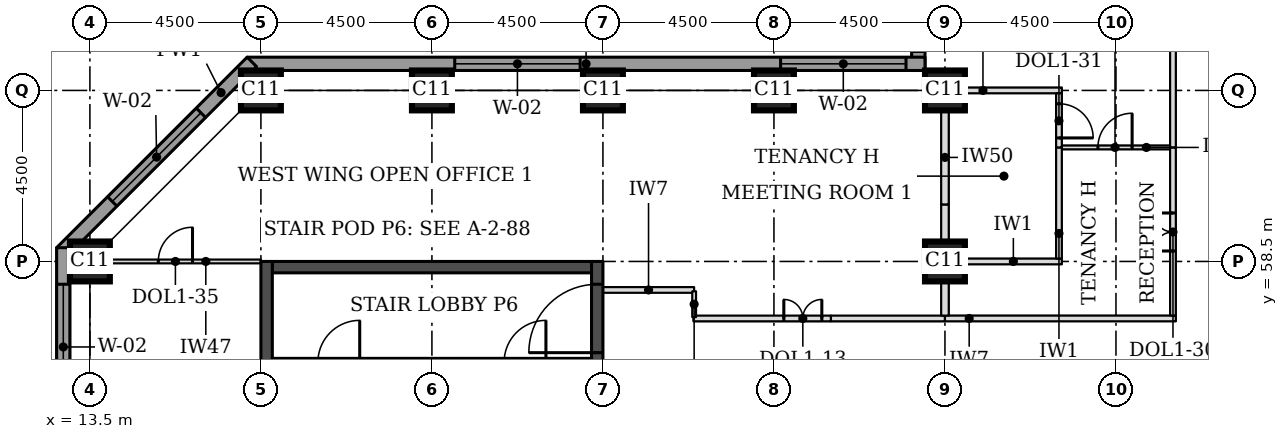
"""IFC4 building model, lengths in metres.
Left out: names, types, materials, properties, quantities, classifications, styles, units other than length and angle.
Written with IfcOpenShell. Run it as: python <this file> out.ifc"""

import sys

from ifc_helpers import new_model, si_unit, direction, frame, frame_2d, origin, origin_2d, place, context, subcontext, project, spatial, rectangle, extrude, element, fill, save


model = new_model("IFC4")
c1 = context("Model", 3, precision=1e-05, world=origin(), true_north=direction((0.0, 1.0)))
c2 = subcontext(c1, "Body", "Model", "MODEL_VIEW")
j1 = project(units=[si_unit("LENGTHUNIT", "METRE"), si_unit("PLANEANGLEUNIT", "RADIAN")], contexts=[c1])
p1 = place(None, origin())
s1 = spatial("IfcSite", under=j1, at=p1, CompositionType="ELEMENT")
p2 = place(p1, origin())
s2 = spatial("IfcBuilding", under=s1, at=p2, CompositionType="ELEMENT")
p3 = place(p2, frame((0.0, 0.0, 78.9)))
s3 = spatial("IfcBuildingStorey", under=s2, at=p3, CompositionType="ELEMENT", Elevation=78.9)
for number, where, z_axis, x_axis in (
    (1, (13.5, 58.5, 0.0), (0.0, 0.0, 1.0), (1.0, 0.0, 0.0)),
    (2, (36.0, 58.5, 0.0), (0.0, 0.0, 1.0), (1.0, 0.0, 0.0)),
    (3, (18.0, 63.0, 0.0), (0.0, 0.0, 1.0), (1.0, 0.0, 0.0)),
    (4, (22.5, 63.0, 0.0), (0.0, 0.0, 1.0), (1.0, 0.0, 0.0)),
    (5, (27.0, 63.0, 0.0), (0.0, 0.0, 1.0), (1.0, 0.0, 0.0)),
    (6, (31.5, 63.0, 0.0), (0.0, 0.0, 1.0), (1.0, 0.0, 0.0)),
    (7, (36.0, 63.0, 0.0), (0.0, 0.0, 1.0), (1.0, 0.0, 0.0)),
):
    element("IfcColumn", number, at=place(p3, frame(where, z_axis=z_axis, x_axis=x_axis)), inside=s3, PredefinedType="COLUMN", context=c2, shape_type="SweptSolid", body=[
        extrude(rectangle(XDim=1.05, YDim=1.05, at=origin_2d()), origin(), (0.0, 0.0, 1.0), 3.7),
    ])
p4 = place(p3, frame((18.3, 58.35, 0.0), z_axis=(0.0, 0.0, 1.0), x_axis=(1.0, 0.0, 0.0)))
e8 = element("IfcWall", 8, at=p4, inside=s3, PredefinedType="SHEAR", context=c2, shape_type="SweptSolid", body=[
    extrude(rectangle(XDim=8.4, YDim=0.3, at=frame_2d((4.2, 0.0))), origin(), (0.0, 0.0, 1.0), 3.7),
])
p5 = place(p3, frame((18.15, 49.5, 0.0), z_axis=(0.0, 0.0, 1.0), x_axis=(0.0, 1.0, 0.0)))
e9 = element("IfcWall", 9, at=p5, inside=s3, PredefinedType="SHEAR", context=c2, shape_type="SweptSolid", body=[
    extrude(rectangle(XDim=9.0, YDim=0.3, at=frame_2d((4.5, 0.0))), origin(), (0.0, 0.0, 1.0), 3.7),
])
p6 = place(p3, frame((26.85, 49.5, 0.0), z_axis=(0.0, 0.0, 1.0), x_axis=(0.0, 1.0, 0.0)))
e10 = element("IfcWall", 10, at=p6, inside=s3, PredefinedType="SHEAR", context=c2, shape_type="SweptSolid", body=[
    extrude(rectangle(XDim=9.0, YDim=0.3, at=frame_2d((4.5, 0.0))), origin(), (0.0, 0.0, 1.0), 3.7),
])
p7 = place(p6, frame((6.6, 0.0, 0.0)))
e11 = element("IfcOpeningElement", 11, at=p7, cuts=e10, PredefinedType="OPENING", context=c2, shape_type="SweptSolid", body=[
    extrude(rectangle(XDim=1.8, YDim=2.1, at=frame_2d((0.9, 1.05))), frame((0.0, 0.16, 0.0), z_axis=(0.0, -1.0, 0.0), x_axis=(1.0, 0.0, 0.0)), (0.0, 0.0, 1.0), 0.32),
])
p8 = place(p3, frame((35.3, 76.862, 0.0), z_axis=(0.0, 0.0, 1.0), x_axis=(0.0, -1.0, 0.0)))
e12 = element("IfcWall", 12, at=p8, inside=s3, PredefinedType="STANDARD", context=c2, shape_type="SweptSolid", body=[
    extrude(rectangle(XDim=13.337, YDim=0.35, at=frame_2d((6.669, 0.0))), origin(), (0.0, 0.0, 1.0), 3.525),
])
p9 = place(p8, frame((9.537, 0.0, 0.9)))
e13 = element("IfcOpeningElement", 13, at=p9, cuts=e12, PredefinedType="OPENING", context=c2, shape_type="SweptSolid", body=[
    extrude(rectangle(XDim=3.3, YDim=1.9, at=frame_2d((1.65, 0.95))), frame((0.0, 0.185, 0.0), z_axis=(0.0, -1.0, 0.0), x_axis=(1.0, 0.0, 0.0)), (0.0, 0.0, 1.0), 0.37),
])
p10 = place(p3, frame((35.475, 63.7, 0.0), z_axis=(0.0, 0.0, 1.0), x_axis=(-1.0, 0.0, 0.0)))
e14 = element("IfcWall", 14, at=p10, inside=s3, PredefinedType="STANDARD", context=c2, shape_type="SweptSolid", body=[
    extrude(rectangle(XDim=17.837, YDim=0.35, at=frame_2d((8.919, 0.0))), origin(), (0.0, 0.0, 1.0), 3.525),
])
p11 = place(p10, frame((0.5, 0.0, 0.9)))
e15 = element("IfcOpeningElement", 15, at=p11, cuts=e14, PredefinedType="OPENING", context=c2, shape_type="SweptSolid", body=[
    extrude(rectangle(XDim=3.3, YDim=1.9, at=frame_2d((1.65, 0.95))), frame((0.0, 0.185, 0.0), z_axis=(0.0, -1.0, 0.0), x_axis=(1.0, 0.0, 0.0)), (0.0, 0.0, 1.0), 0.37),
])
p12 = place(p10, frame((9.075, 0.0, 0.9)))
e16 = element("IfcOpeningElement", 16, at=p12, cuts=e14, PredefinedType="OPENING", context=c2, shape_type="SweptSolid", body=[
    extrude(rectangle(XDim=3.3, YDim=1.9, at=frame_2d((1.65, 0.95))), frame((0.0, 0.185, 0.0), z_axis=(0.0, -1.0, 0.0), x_axis=(1.0, 0.0, 0.0)), (0.0, 0.0, 1.0), 0.37),
])
p13 = place(p3, frame((17.761, 63.751, 0.0), z_axis=(0.0, 0.0, 1.0), x_axis=(-0.707106781187, -0.707106781187, 0.0)))
e17 = element("IfcWall", 17, at=p13, inside=s3, PredefinedType="STANDARD", context=c2, shape_type="SweptSolid", body=[
    extrude(rectangle(XDim=7.089, YDim=0.35, at=frame_2d((3.544, 0.0))), origin(), (0.0, 0.0, 1.0), 3.525),
])
p14 = place(p13, frame((1.894, 0.0, 0.9)))
e18 = element("IfcOpeningElement", 18, at=p14, cuts=e17, PredefinedType="OPENING", context=c2, shape_type="SweptSolid", body=[
    extrude(rectangle(XDim=3.3, YDim=1.9, at=frame_2d((1.65, 0.95))), frame((0.0, 0.185, 0.0), z_axis=(0.0, -1.0, 0.0), x_axis=(1.0, 0.0, 0.0)), (0.0, 0.0, 1.0), 0.37),
])
p15 = place(p3, frame((12.8, 58.862, 0.0), z_axis=(0.0, 0.0, 1.0), x_axis=(0.0, -1.0, 0.0)))
e19 = element("IfcWall", 19, at=p15, inside=s3, PredefinedType="STANDARD", context=c2, shape_type="SweptSolid", body=[
    extrude(rectangle(XDim=14.225, YDim=0.35, at=frame_2d((7.112, 0.0))), origin(), (0.0, 0.0, 1.0), 3.525),
])
p16 = place(p15, frame((0.962, 0.0, 0.9)))
e20 = element("IfcOpeningElement", 20, at=p16, cuts=e19, PredefinedType="OPENING", context=c2, shape_type="SweptSolid", body=[
    extrude(rectangle(XDim=3.3, YDim=1.9, at=frame_2d((1.65, 0.95))), frame((0.0, 0.185, 0.0), z_axis=(0.0, -1.0, 0.0), x_axis=(1.0, 0.0, 0.0)), (0.0, 0.0, 1.0), 0.37),
])
p17 = place(p15, frame((5.462, 0.0, 0.9)))
e21 = element("IfcOpeningElement", 21, at=p17, cuts=e19, PredefinedType="OPENING", context=c2, shape_type="SweptSolid", body=[
    extrude(rectangle(XDim=3.3, YDim=1.9, at=frame_2d((1.65, 0.95))), frame((0.0, 0.185, 0.0), z_axis=(0.0, -1.0, 0.0), x_axis=(1.0, 0.0, 0.0)), (0.0, 0.0, 1.0), 0.37),
])
p18 = place(p15, frame((9.962, 0.0, 0.9)))
e22 = element("IfcOpeningElement", 22, at=p18, cuts=e19, PredefinedType="OPENING", context=c2, shape_type="SweptSolid", body=[
    extrude(rectangle(XDim=3.3, YDim=1.9, at=frame_2d((1.65, 0.95))), frame((0.0, 0.185, 0.0), z_axis=(0.0, -1.0, 0.0), x_axis=(1.0, 0.0, 0.0)), (0.0, 0.0, 1.0), 0.37),
])
p19 = place(p3, frame((29.38, 57.0, 0.0), z_axis=(0.0, 0.0, 1.0), x_axis=(1.0, 0.0, 0.0)))
e23 = element("IfcWall", 23, at=p19, inside=s3, PredefinedType="PARTITIONING", context=c2, shape_type="SweptSolid", body=[
    extrude(rectangle(XDim=3.62, YDim=0.15, at=frame_2d((1.81, 0.0))), origin(), (0.0, 0.0, 1.0), 3.55),
])
p20 = place(p19, frame((2.38, 0.0, 0.0)))
e24 = element("IfcOpeningElement", 24, at=p20, cuts=e23, PredefinedType="OPENING", context=c2, shape_type="SweptSolid", body=[
    extrude(rectangle(XDim=1.0, YDim=2.1, at=frame_2d((0.5, 1.05))), frame((0.0, 0.085, 0.0), z_axis=(0.0, -1.0, 0.0), x_axis=(1.0, 0.0, 0.0)), (0.0, 0.0, 1.0), 0.17),
])
p21 = place(p3, frame((33.0, 57.0, 0.0), z_axis=(0.0, 0.0, 1.0), x_axis=(1.0, 0.0, 0.0)))
e25 = element("IfcWall", 25, at=p21, inside=s3, PredefinedType="PARTITIONING", context=c2, shape_type="SweptSolid", body=[
    extrude(rectangle(XDim=3.0, YDim=0.15, at=frame_2d((1.5, 0.0))), origin(), (0.0, 0.0, 1.0), 3.55),
])
p22 = place(p3, frame((36.0, 57.0, 0.0), z_axis=(0.0, 0.0, 1.0), x_axis=(1.0, 0.0, 0.0)))
e26 = element("IfcWall", 26, at=p22, inside=s3, PredefinedType="PARTITIONING", context=c2, shape_type="SweptSolid", body=[
    extrude(rectangle(XDim=6.075, YDim=0.15, at=frame_2d((3.038, 0.0))), origin(), (0.0, 0.0, 1.0), 3.55),
])
p23 = place(p3, frame((36.525, 58.5, 0.0), z_axis=(0.0, 0.0, 1.0), x_axis=(1.0, 0.0, 0.0)))
e27 = element("IfcWall", 27, at=p23, inside=s3, PredefinedType="PARTITIONING", context=c2, shape_type="SweptSolid", body=[
    extrude(rectangle(XDim=2.55, YDim=0.15, at=frame_2d((1.275, 0.0))), origin(), (0.0, 0.0, 1.0), 3.55),
])
p24 = place(p3, frame((39.075, 61.5, 0.0), z_axis=(0.0, 0.0, 1.0), x_axis=(1.0, 0.0, 0.0)))
e28 = element("IfcWall", 28, at=p24, inside=s3, PredefinedType="PARTITIONING", context=c2, shape_type="SweptSolid", body=[
    extrude(rectangle(XDim=2.85, YDim=0.1, at=frame_2d((1.425, 0.0))), origin(), (0.0, 0.0, 1.0), 3.55),
])
p25 = place(p24, frame((0.95, 0.0, 0.0)))
e29 = element("IfcOpeningElement", 29, at=p25, cuts=e28, PredefinedType="OPENING", context=c2, shape_type="SweptSolid", body=[
    extrude(rectangle(XDim=0.9, YDim=2.1, at=frame_2d((0.45, 1.05))), frame((0.0, 0.06, 0.0), z_axis=(0.0, -1.0, 0.0), x_axis=(1.0, 0.0, 0.0)), (0.0, 0.0, 1.0), 0.12),
])
p26 = place(p3, frame((36.525, 63.0, 0.0), z_axis=(0.0, 0.0, 1.0), x_axis=(1.0, 0.0, 0.0)))
e30 = element("IfcWall", 30, at=p26, inside=s3, PredefinedType="PARTITIONING", context=c2, shape_type="SweptSolid", body=[
    extrude(rectangle(XDim=2.55, YDim=0.15, at=frame_2d((1.275, 0.0))), origin(), (0.0, 0.0, 1.0), 3.55),
])
p27 = place(p3, frame((36.0, 57.075, 0.0), z_axis=(0.0, 0.0, 1.0), x_axis=(0.0, 1.0, 0.0)))
e31 = element("IfcWall", 31, at=p27, inside=s3, PredefinedType="PARTITIONING", context=c2, shape_type="SweptSolid", body=[
    extrude(rectangle(XDim=0.9, YDim=0.2, at=frame_2d((0.45, 0.0))), origin(), (0.0, 0.0, 1.0), 2.8),
])
p28 = place(p3, frame((42.0, 57.075, 0.0), z_axis=(0.0, 0.0, 1.0), x_axis=(0.0, 1.0, 0.0)))
e32 = element("IfcWall", 32, at=p28, inside=s3, PredefinedType="PARTITIONING", context=c2, shape_type="SweptSolid", body=[
    extrude(rectangle(XDim=4.425, YDim=0.15, at=frame_2d((2.212, 0.0))), origin(), (0.0, 0.0, 1.0), 3.55),
])
p29 = place(p28, frame((1.7, 0.0, 0.0)))
e33 = element("IfcOpeningElement", 33, at=p29, cuts=e32, PredefinedType="OPENING", context=c2, shape_type="SweptSolid", body=[
    extrude(rectangle(XDim=1.0, YDim=2.1, at=frame_2d((0.5, 1.05))), frame((0.0, 0.085, 0.0), z_axis=(0.0, -1.0, 0.0), x_axis=(1.0, 0.0, 0.0)), (0.0, 0.0, 1.0), 0.17),
])
p30 = place(p3, frame((39.0, 58.575, 0.0), z_axis=(0.0, 0.0, 1.0), x_axis=(0.0, 1.0, 0.0)))
e34 = element("IfcWall", 34, at=p30, inside=s3, PredefinedType="PARTITIONING", context=c2, shape_type="SweptSolid", body=[
    extrude(rectangle(XDim=2.925, YDim=0.15, at=frame_2d((1.462, 0.0))), origin(), (0.0, 0.0, 1.0), 3.55),
])
p31 = place(p3, frame((36.0, 58.995, 0.0), z_axis=(0.0, 0.0, 1.0), x_axis=(0.0, 1.0, 0.0)))
e35 = element("IfcWall", 35, at=p31, inside=s3, PredefinedType="PARTITIONING", context=c2, shape_type="SweptSolid", body=[
    extrude(rectangle(XDim=1.005, YDim=0.2, at=frame_2d((0.502, 0.0))), origin(), (0.0, 0.0, 1.0), 2.8),
])
p32 = place(p3, frame((36.0, 60.0, 0.0), z_axis=(0.0, 0.0, 1.0), x_axis=(0.0, 1.0, 0.0)))
e36 = element("IfcWall", 36, at=p32, inside=s3, PredefinedType="PARTITIONING", context=c2, shape_type="SweptSolid", body=[
    extrude(rectangle(XDim=2.475, YDim=0.2, at=frame_2d((1.238, 0.0))), origin(), (0.0, 0.0, 1.0), 2.8),
])
p33 = place(p3, frame((39.0, 61.5, 0.0), z_axis=(0.0, 0.0, 1.0), x_axis=(0.0, 1.0, 0.0)))
e37 = element("IfcWall", 37, at=p33, inside=s3, PredefinedType="PARTITIONING", context=c2, shape_type="SweptSolid", body=[
    extrude(rectangle(XDim=1.425, YDim=0.15, at=frame_2d((0.712, 0.0))), origin(), (0.0, 0.0, 1.0), 3.55),
])
p34 = place(p33, frame((0.25, 0.0, 0.0)))
e38 = element("IfcOpeningElement", 38, at=p34, cuts=e37, PredefinedType="OPENING", context=c2, shape_type="SweptSolid", body=[
    extrude(rectangle(XDim=0.9, YDim=2.1, at=frame_2d((0.45, 1.05))), frame((0.0, 0.085, 0.0), z_axis=(0.0, -1.0, 0.0), x_axis=(1.0, 0.0, 0.0)), (0.0, 0.0, 1.0), 0.17),
])
p35 = place(p3, frame((42.0, 61.5, 0.0), z_axis=(0.0, 0.0, 1.0), x_axis=(0.0, 1.0, 0.0)))
e39 = element("IfcWall", 39, at=p35, inside=s3, PredefinedType="PARTITIONING", context=c2, shape_type="SweptSolid", body=[
    extrude(rectangle(XDim=10.5, YDim=0.15, at=frame_2d((5.25, 0.0))), origin(), (0.0, 0.0, 1.0), 3.55),
])
p36 = place(p3, frame((13.5, 58.5, 0.0), z_axis=(0.0, 0.0, 1.0), x_axis=(1.0, 0.0, 0.0)))
e40 = element("IfcWall", 40, at=p36, inside=s3, PredefinedType="PARTITIONING", context=c2, shape_type="SweptSolid", body=[
    extrude(rectangle(XDim=4.5, YDim=0.1, at=frame_2d((2.25, 0.0))), origin(), (0.0, 0.0, 1.0), 2.55),
])
p37 = place(p36, frame((1.8, 0.0, 0.0)))
e41 = element("IfcOpeningElement", 41, at=p37, cuts=e40, PredefinedType="OPENING", context=c2, shape_type="SweptSolid", body=[
    extrude(rectangle(XDim=0.9, YDim=2.1, at=frame_2d((0.45, 1.05))), frame((0.0, 0.06, 0.0), z_axis=(0.0, -1.0, 0.0), x_axis=(1.0, 0.0, 0.0)), (0.0, 0.0, 1.0), 0.12),
])
p38 = place(p3, frame((27.0, 57.75, 0.0), z_axis=(0.0, 0.0, 1.0), x_axis=(1.0, 0.0, 0.0)))
e42 = element("IfcWall", 42, at=p38, inside=s3, PredefinedType="PARTITIONING", context=c2, shape_type="SweptSolid", body=[
    extrude(rectangle(XDim=2.4, YDim=0.15, at=frame_2d((1.2, 0.0))), origin(), (0.0, 0.0, 1.0), 3.55),
])
p39 = place(p3, frame((29.4, 57.715, 0.0), z_axis=(0.0, 0.0, 1.0), x_axis=(0.0, -1.0, 0.0)))
e43 = element("IfcWall", 43, at=p39, inside=s3, PredefinedType="PARTITIONING", context=c2, shape_type="SweptSolid", body=[
    extrude(rectangle(XDim=0.68, YDim=0.1, at=frame_2d((0.34, 0.0))), origin(), (0.0, 0.0, 1.0), 3.55),
])
p40 = place(p3, frame((21.8, 55.85, 0.0), z_axis=(0.0, 0.0, 1.0), x_axis=(1.0, 0.0, 0.0)))
e44 = element("IfcWall", 44, at=p40, inside=s3, PredefinedType="SOLIDWALL", context=c2, shape_type="SweptSolid", body=[
    extrude(rectangle(XDim=1.4, YDim=0.2, at=frame_2d((0.7, 0.0))), origin(), (0.0, 0.0, 1.0), 3.55),
])
p41 = place(p3, frame((18.3, 55.85, 0.0), z_axis=(0.0, 0.0, 1.0), x_axis=(1.0, 0.0, 0.0)))
e45 = element("IfcWall", 45, at=p41, inside=s3, PredefinedType="SOLIDWALL", context=c2, shape_type="SweptSolid", body=[
    extrude(rectangle(XDim=3.5, YDim=0.2, at=frame_2d((1.75, 0.0))), origin(), (0.0, 0.0, 1.0), 3.55),
])
p42 = place(p41, frame((1.2, 0.0, 0.0)))
e46 = element("IfcOpeningElement", 46, at=p42, cuts=e45, PredefinedType="OPENING", context=c2, shape_type="SweptSolid", body=[
    extrude(rectangle(XDim=1.1, YDim=2.1, at=frame_2d((0.55, 1.05))), frame((0.0, 0.11, 0.0), z_axis=(0.0, -1.0, 0.0), x_axis=(1.0, 0.0, 0.0)), (0.0, 0.0, 1.0), 0.22),
])
p43 = place(p3, frame((23.2, 55.85, 0.0), z_axis=(0.0, 0.0, 1.0), x_axis=(1.0, 0.0, 0.0)))
e47 = element("IfcWall", 47, at=p43, inside=s3, PredefinedType="SOLIDWALL", context=c2, shape_type="SweptSolid", body=[
    extrude(rectangle(XDim=3.5, YDim=0.2, at=frame_2d((1.75, 0.0))), origin(), (0.0, 0.0, 1.0), 3.55),
])
p44 = place(p43, frame((1.2, 0.0, 0.0)))
e48 = element("IfcOpeningElement", 48, at=p44, cuts=e47, PredefinedType="OPENING", context=c2, shape_type="SweptSolid", body=[
    extrude(rectangle(XDim=1.1, YDim=2.1, at=frame_2d((0.55, 1.05))), frame((0.0, 0.11, 0.0), z_axis=(0.0, -1.0, 0.0), x_axis=(1.0, 0.0, 0.0)), (0.0, 0.0, 1.0), 0.22),
])
p45 = place(p11, origin())
e49 = element("IfcWindow", 49, at=p45, inside=s3, PartitioningType="SINGLE_PANEL", PredefinedType="WINDOW", context=c2, shape_type="SweptSolid", body=[
    extrude(rectangle(XDim=3.3, YDim=1.9, at=frame_2d((1.65, 0.95))), frame((0.0, 0.085, 0.0), z_axis=(0.0, -1.0, 0.0), x_axis=(1.0, 0.0, 0.0)), (0.0, 0.0, 1.0), 0.06),
])
fill(e15, e49)
p46 = place(p12, origin())
e50 = element("IfcWindow", 50, at=p46, inside=s3, PartitioningType="SINGLE_PANEL", PredefinedType="WINDOW", context=c2, shape_type="SweptSolid", body=[
    extrude(rectangle(XDim=3.3, YDim=1.9, at=frame_2d((1.65, 0.95))), frame((0.0, 0.085, 0.0), z_axis=(0.0, -1.0, 0.0), x_axis=(1.0, 0.0, 0.0)), (0.0, 0.0, 1.0), 0.06),
])
fill(e16, e50)
p47 = place(p14, origin())
e51 = element("IfcWindow", 51, at=p47, inside=s3, PartitioningType="SINGLE_PANEL", PredefinedType="WINDOW", context=c2, shape_type="SweptSolid", body=[
    extrude(rectangle(XDim=3.3, YDim=1.9, at=frame_2d((1.65, 0.95))), frame((0.0, 0.085, 0.0), z_axis=(0.0, -1.0, 0.0), x_axis=(1.0, 0.0, 0.0)), (0.0, 0.0, 1.0), 0.06),
])
fill(e18, e51)
p48 = place(p16, origin())
e52 = element("IfcWindow", 52, at=p48, inside=s3, PartitioningType="SINGLE_PANEL", PredefinedType="WINDOW", context=c2, shape_type="SweptSolid", body=[
    extrude(rectangle(XDim=3.3, YDim=1.9, at=frame_2d((1.65, 0.95))), frame((0.0, 0.085, 0.0), z_axis=(0.0, -1.0, 0.0), x_axis=(1.0, 0.0, 0.0)), (0.0, 0.0, 1.0), 0.06),
])
fill(e20, e52)
p49 = place(p29, origin())
e53 = element("IfcDoor", 53, at=p49, inside=s3, OperationType="DOUBLE_DOOR_SINGLE_SWING", PredefinedType="DOOR", context=c2, shape_type="SweptSolid", body=[
    extrude(rectangle(XDim=1.0, YDim=2.1, at=frame_2d((0.5, 1.05))), frame((0.0, 0.025, 0.0), z_axis=(0.0, -1.0, 0.0), x_axis=(1.0, 0.0, 0.0)), (0.0, 0.0, 1.0), 0.05),
])
fill(e33, e53)
p50 = place(p25, origin())
e54 = element("IfcDoor", 54, at=p50, inside=s3, OperationType="SINGLE_SWING_RIGHT", PredefinedType="DOOR", context=c2, shape_type="SweptSolid", body=[
    extrude(rectangle(XDim=0.9, YDim=2.1, at=frame_2d((0.45, 1.05))), frame((0.0, 0.025, 0.0), z_axis=(0.0, -1.0, 0.0), x_axis=(1.0, 0.0, 0.0)), (0.0, 0.0, 1.0), 0.05),
])
fill(e29, e54)
p51 = place(p34, frame((0.9, 0.0, 0.0), z_axis=(0.0, 0.0, 1.0), x_axis=(-1.0, 0.0, 0.0)))
e55 = element("IfcDoor", 55, at=p51, inside=s3, OperationType="SINGLE_SWING_RIGHT", PredefinedType="DOOR", context=c2, shape_type="SweptSolid", body=[
    extrude(rectangle(XDim=0.9, YDim=2.1, at=frame_2d((0.45, 1.05))), frame((0.0, 0.025, 0.0), z_axis=(0.0, -1.0, 0.0), x_axis=(1.0, 0.0, 0.0)), (0.0, 0.0, 1.0), 0.05),
])
fill(e38, e55)
p52 = place(p20, origin())
e56 = element("IfcDoor", 56, at=p52, inside=s3, OperationType="DOUBLE_DOOR_SINGLE_SWING", PredefinedType="DOOR", context=c2, shape_type="SweptSolid", body=[
    extrude(rectangle(XDim=1.0, YDim=2.1, at=frame_2d((0.5, 1.05))), frame((0.0, 0.025, 0.0), z_axis=(0.0, -1.0, 0.0), x_axis=(1.0, 0.0, 0.0)), (0.0, 0.0, 1.0), 0.05),
])
fill(e24, e56)
p53 = place(p37, origin())
e57 = element("IfcDoor", 57, at=p53, inside=s3, OperationType="SINGLE_SWING_RIGHT", PredefinedType="DOOR", context=c2, shape_type="SweptSolid", body=[
    extrude(rectangle(XDim=0.9, YDim=2.1, at=frame_2d((0.45, 1.05))), frame((0.0, 0.025, 0.0), z_axis=(0.0, -1.0, 0.0), x_axis=(1.0, 0.0, 0.0)), (0.0, 0.0, 1.0), 0.05),
])
fill(e41, e57)
p54 = place(p7, origin())
e58 = element("IfcDoor", 58, at=p54, inside=s3, OperationType="SINGLE_SWING_LEFT", PredefinedType="DOOR", context=c2, shape_type="SweptSolid", body=[
    extrude(rectangle(XDim=1.8, YDim=2.1, at=frame_2d((0.9, 1.05))), frame((0.0, 0.025, 0.0), z_axis=(0.0, -1.0, 0.0), x_axis=(1.0, 0.0, 0.0)), (0.0, 0.0, 1.0), 0.05),
])
fill(e11, e58)
save(model, sys.argv[1])
